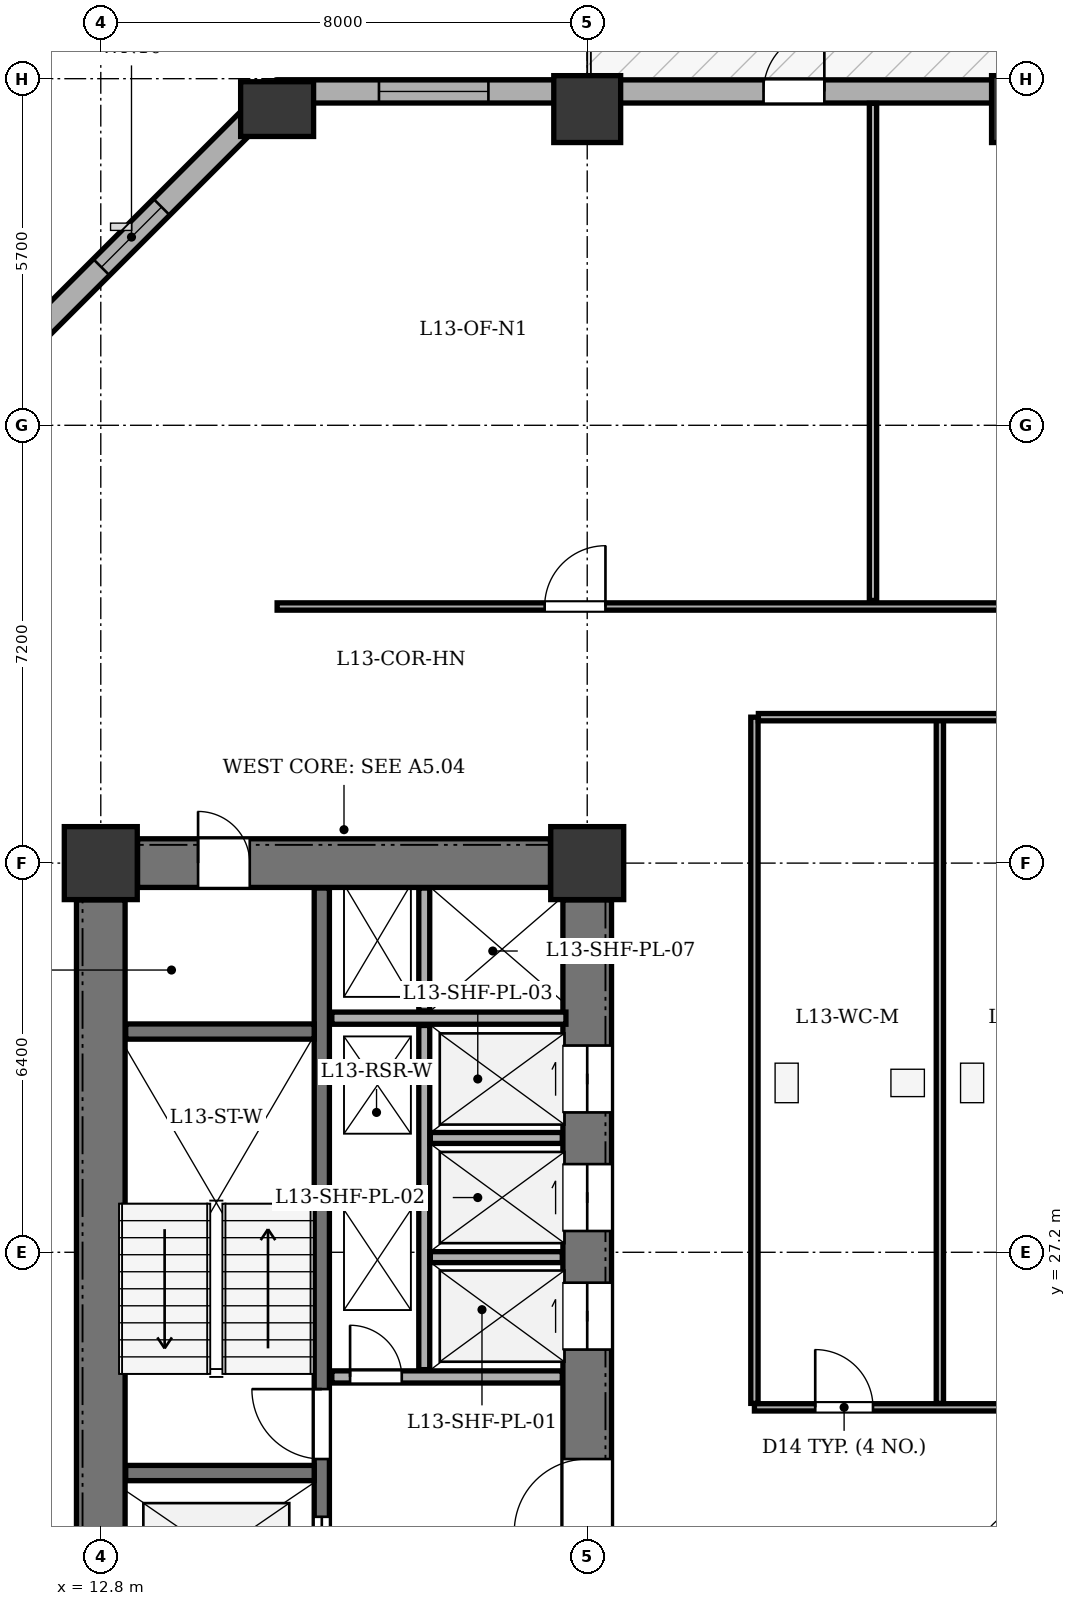
"""IFC4 building model, lengths in metres.
Left out: names, types, materials, properties, quantities, classifications, styles, units other than length and angle.
Written with IfcOpenShell. Run it as: python <this file> out.ifc"""

import sys

from ifc_helpers import new_model, si_unit, direction, frame, frame_2d, origin, origin_2d, place, context, subcontext, project, spatial, rectangle, extrude, element, fill, save


model = new_model("IFC4")
c1 = context("Model", 3, precision=1e-05, world=origin(), true_north=direction((0.0, 1.0)))
c2 = subcontext(c1, "Body", "Model", "MODEL_VIEW")
j1 = project(units=[si_unit("LENGTHUNIT", "METRE"), si_unit("PLANEANGLEUNIT", "RADIAN")], contexts=[c1])
p1 = place(None, origin())
s1 = spatial("IfcSite", under=j1, at=p1, CompositionType="ELEMENT")
p2 = place(p1, origin())
s2 = spatial("IfcBuilding", under=s1, at=p2, CompositionType="ELEMENT")
p3 = place(p2, frame((0.0, 0.0, 55.5)))
s3 = spatial("IfcBuildingStorey", under=s2, at=p3, CompositionType="ELEMENT", Elevation=55.5)
for number, where, z_axis, x_axis in (
    (1, (12.8, 33.6, 0.0), (0.0, 0.0, 1.0), (1.0, 0.0, 0.0)),
    (2, (20.8, 33.6, 0.0), (0.0, 0.0, 1.0), (1.0, 0.0, 0.0)),
):
    element("IfcColumn", number, at=place(p3, frame(where, z_axis=z_axis, x_axis=x_axis)), inside=s3, PredefinedType="COLUMN", context=c2, shape_type="SweptSolid", body=[
        extrude(rectangle(XDim=1.2, YDim=1.2, at=origin_2d()), origin(), (0.0, 0.0, 1.0), 3.9),
    ])
p4 = place(p3, frame((15.7, 46.0, 0.0), z_axis=(0.0, 0.0, 1.0), x_axis=(1.0, 0.0, 0.0)))
e3 = element("IfcColumn", 3, at=p4, inside=s3, PredefinedType="COLUMN", context=c2, shape_type="SweptSolid", body=[
    extrude(rectangle(XDim=0.9, YDim=1.2, at=origin_2d()), origin(), (0.0, 0.0, 1.0), 3.9),
])
for number, where, z_axis, x_axis in (
    (4, (20.8, 46.0, 0.0), (0.0, 0.0, 1.0), (1.0, 0.0, 0.0)),
    (5, (28.0, 46.0, 0.0), (0.0, 0.0, 1.0), (1.0, 0.0, 0.0)),
):
    element("IfcColumn", number, at=place(p3, frame(where, z_axis=z_axis, x_axis=x_axis)), inside=s3, PredefinedType="COLUMN", context=c2, shape_type="SweptSolid", body=[
        extrude(rectangle(XDim=1.1, YDim=1.1, at=origin_2d()), origin(), (0.0, 0.0, 1.0), 3.9),
    ])
p5 = place(p3, frame((10.91, 41.5, 0.0), z_axis=(0.0, 0.0, 1.0), x_axis=(0.707106781187, 0.707106781187, 0.0)))
e6 = element("IfcWall", 6, at=p5, inside=s3, PredefinedType="STANDARD", context=c2, shape_type="SweptSolid", body=[
    extrude(rectangle(XDim=6.774, YDim=0.38, at=frame_2d((3.387, 0.0))), origin(), (0.0, 0.0, 1.0), 3.135),
])
p6 = place(p5, frame((2.687, 0.0, 0.8)))
e7 = element("IfcOpeningElement", 7, at=p6, cuts=e6, PredefinedType="OPENING", context=c2, shape_type="SweptSolid", body=[
    extrude(rectangle(XDim=1.4, YDim=1.65, at=frame_2d((0.7, 0.825))), frame((0.0, 0.2, 0.0), z_axis=(0.0, -1.0, 0.0), x_axis=(1.0, 0.0, 0.0)), (0.0, 0.0, 1.0), 0.4),
])
p7 = place(p3, frame((15.7, 46.29, 0.0), z_axis=(0.0, 0.0, 1.0), x_axis=(1.0, 0.0, 0.0)))
e8 = element("IfcWall", 8, at=p7, inside=s3, PredefinedType="STANDARD", context=c2, shape_type="SweptSolid", body=[
    extrude(rectangle(XDim=35.0, YDim=0.38, at=frame_2d((17.5, 0.0))), origin(), (0.0, 0.0, 1.0), 3.135),
])
p8 = place(p7, frame((8.0, 0.0, 0.0)))
e9 = element("IfcOpeningElement", 9, at=p8, cuts=e8, PredefinedType="OPENING", context=c2, shape_type="SweptSolid", body=[
    extrude(rectangle(XDim=1.0, YDim=2.02, at=frame_2d((0.5, 1.01))), frame((0.0, 0.2, 0.0), z_axis=(0.0, -1.0, 0.0), x_axis=(1.0, 0.0, 0.0)), (0.0, 0.0, 1.0), 0.4),
])
p9 = place(p7, frame((1.675, 0.0, 0.8)))
e10 = element("IfcOpeningElement", 10, at=p9, cuts=e8, PredefinedType="OPENING", context=c2, shape_type="SweptSolid", body=[
    extrude(rectangle(XDim=1.8, YDim=1.9, at=frame_2d((0.9, 0.95))), frame((0.0, 0.2, 0.0), z_axis=(0.0, -1.0, 0.0), x_axis=(1.0, 0.0, 0.0)), (0.0, 0.0, 1.0), 0.4),
])
p10 = place(p7, frame((13.656, 0.0, 0.8)))
e11 = element("IfcOpeningElement", 11, at=p10, cuts=e8, PredefinedType="OPENING", context=c2, shape_type="SweptSolid", body=[
    extrude(rectangle(XDim=1.8, YDim=1.9, at=frame_2d((0.9, 0.95))), frame((0.0, 0.2, 0.0), z_axis=(0.0, -1.0, 0.0), x_axis=(1.0, 0.0, 0.0)), (0.0, 0.0, 1.0), 0.4),
])
p11 = place(p7, frame((16.344, 0.0, 0.8)))
e12 = element("IfcOpeningElement", 12, at=p11, cuts=e8, PredefinedType="OPENING", context=c2, shape_type="SweptSolid", body=[
    extrude(rectangle(XDim=1.8, YDim=1.9, at=frame_2d((0.9, 0.95))), frame((0.0, 0.2, 0.0), z_axis=(0.0, -1.0, 0.0), x_axis=(1.0, 0.0, 0.0)), (0.0, 0.0, 1.0), 0.4),
])
p12 = place(p7, frame((24.925, 0.0, 0.8)))
e13 = element("IfcOpeningElement", 13, at=p12, cuts=e8, PredefinedType="OPENING", context=c2, shape_type="SweptSolid", body=[
    extrude(rectangle(XDim=1.8, YDim=1.9, at=frame_2d((0.9, 0.95))), frame((0.0, 0.2, 0.0), z_axis=(0.0, -1.0, 0.0), x_axis=(1.0, 0.0, 0.0)), (0.0, 0.0, 1.0), 0.4),
])
p13 = place(p7, frame((30.025, 0.0, 0.8)))
e14 = element("IfcOpeningElement", 14, at=p13, cuts=e8, PredefinedType="OPENING", context=c2, shape_type="SweptSolid", body=[
    extrude(rectangle(XDim=2.4, YDim=1.9, at=frame_2d((1.2, 0.95))), frame((0.0, 0.2, 0.0), z_axis=(0.0, -1.0, 0.0), x_axis=(1.0, 0.0, 0.0)), (0.0, 0.0, 1.0), 0.4),
])
p14 = place(p3, frame((12.8, 21.405, 0.0), z_axis=(0.0, 0.0, 1.0), x_axis=(0.0, 1.0, 0.0)))
e15 = element("IfcWall", 15, at=p14, inside=s3, PredefinedType="SHEAR", context=c2, shape_type="SweptSolid", body=[
    extrude(rectangle(XDim=11.59, YDim=0.8, at=frame_2d((5.795, 0.0))), origin(), (0.0, 0.0, 1.0), 3.6),
])
p15 = place(p3, frame((13.405, 33.6, 0.0), z_axis=(0.0, 0.0, 1.0), x_axis=(1.0, 0.0, 0.0)))
e16 = element("IfcWall", 16, at=p15, inside=s3, PredefinedType="SHEAR", context=c2, shape_type="SweptSolid", body=[
    extrude(rectangle(XDim=6.79, YDim=0.8, at=frame_2d((3.395, 0.0))), origin(), (0.0, 0.0, 1.0), 3.6),
])
p16 = place(p15, frame((0.995, 0.0, 0.0)))
e17 = element("IfcOpeningElement", 17, at=p16, cuts=e16, PredefinedType="OPENING", context=c2, shape_type="SweptSolid", body=[
    extrude(rectangle(XDim=0.85, YDim=2.02, at=frame_2d((0.425, 1.01))), frame((0.0, 0.41, 0.0), z_axis=(0.0, -1.0, 0.0), x_axis=(1.0, 0.0, 0.0)), (0.0, 0.0, 1.0), 0.82),
])
p17 = place(p3, frame((20.8, 21.405, 0.0), z_axis=(0.0, 0.0, 1.0), x_axis=(0.0, 1.0, 0.0)))
e18 = element("IfcWall", 18, at=p17, inside=s3, PredefinedType="SHEAR", context=c2, shape_type="SweptSolid", body=[
    extrude(rectangle(XDim=11.59, YDim=0.8, at=frame_2d((5.795, 0.0))), origin(), (0.0, 0.0, 1.0), 3.6),
])
p18 = place(p17, frame((1.195, 0.0, 0.0)))
e19 = element("IfcOpeningElement", 19, at=p18, cuts=e18, PredefinedType="OPENING", context=c2, shape_type="SweptSolid", body=[
    extrude(rectangle(XDim=1.2, YDim=2.15, at=frame_2d((0.6, 1.075))), frame((0.0, 0.41, 0.0), z_axis=(0.0, -1.0, 0.0), x_axis=(1.0, 0.0, 0.0)), (0.0, 0.0, 1.0), 0.82),
])
p19 = place(p17, frame((4.195, 0.0, 0.0)))
e20 = element("IfcOpeningElement", 20, at=p19, cuts=e18, PredefinedType="OPENING", context=c2, shape_type="SweptSolid", body=[
    extrude(rectangle(XDim=1.1, YDim=2.1, at=frame_2d((0.55, 1.05))), frame((0.0, 0.41, 0.0), z_axis=(0.0, -1.0, 0.0), x_axis=(1.0, 0.0, 0.0)), (0.0, 0.0, 1.0), 0.82),
])
p20 = place(p17, frame((6.145, 0.0, 0.0)))
e21 = element("IfcOpeningElement", 21, at=p20, cuts=e18, PredefinedType="OPENING", context=c2, shape_type="SweptSolid", body=[
    extrude(rectangle(XDim=1.1, YDim=2.1, at=frame_2d((0.55, 1.05))), frame((0.0, 0.41, 0.0), z_axis=(0.0, -1.0, 0.0), x_axis=(1.0, 0.0, 0.0)), (0.0, 0.0, 1.0), 0.82),
])
p21 = place(p17, frame((8.095, 0.0, 0.0)))
e22 = element("IfcOpeningElement", 22, at=p21, cuts=e18, PredefinedType="OPENING", context=c2, shape_type="SweptSolid", body=[
    extrude(rectangle(XDim=1.1, YDim=2.1, at=frame_2d((0.55, 1.05))), frame((0.0, 0.41, 0.0), z_axis=(0.0, -1.0, 0.0), x_axis=(1.0, 0.0, 0.0)), (0.0, 0.0, 1.0), 0.82),
])
p22 = place(p3, frame((16.435, 21.21, 0.0), z_axis=(0.0, 0.0, 1.0), x_axis=(0.0, 1.0, 0.0)))
e23 = element("IfcWall", 23, at=p22, inside=s3, PredefinedType="SHEAR", context=c2, shape_type="SweptSolid", body=[
    extrude(rectangle(XDim=11.98, YDim=0.25, at=frame_2d((5.99, 0.0))), origin(), (0.0, 0.0, 1.0), 3.6),
])
p23 = place(p22, frame((0.44, 0.0, 0.0)))
e24 = element("IfcOpeningElement", 24, at=p23, cuts=e23, PredefinedType="OPENING", context=c2, shape_type="SweptSolid", body=[
    extrude(rectangle(XDim=1.2, YDim=2.15, at=frame_2d((0.6, 1.075))), frame((0.0, 0.135, 0.0), z_axis=(0.0, -1.0, 0.0), x_axis=(1.0, 0.0, 0.0)), (0.0, 0.0, 1.0), 0.27),
])
p24 = place(p22, frame((2.59, 0.0, 0.0)))
e25 = element("IfcOpeningElement", 25, at=p24, cuts=e23, PredefinedType="OPENING", context=c2, shape_type="SweptSolid", body=[
    extrude(rectangle(XDim=1.15, YDim=2.15, at=frame_2d((0.575, 1.075))), frame((0.0, 0.135, 0.0), z_axis=(0.0, -1.0, 0.0), x_axis=(1.0, 0.0, 0.0)), (0.0, 0.0, 1.0), 0.27),
])
for number, where, z_axis, x_axis in (
    (26, (13.21, 23.57, 0.0), (0.0, 0.0, 1.0), (1.0, 0.0, 0.0)),
    (27, (13.21, 30.83, 0.0), (0.0, 0.0, 1.0), (1.0, 0.0, 0.0)),
):
    element("IfcWall", number, at=place(p3, frame(where, z_axis=z_axis, x_axis=x_axis)), inside=s3, PredefinedType="SHEAR", context=c2, shape_type="SweptSolid", body=[
        extrude(rectangle(XDim=3.1, YDim=0.25, at=frame_2d((1.55, 0.0))), origin(), (0.0, 0.0, 1.0), 3.6),
    ])
p25 = place(p3, frame((16.6, 25.15, 0.0), z_axis=(0.0, 0.0, 1.0), x_axis=(1.0, 0.0, 0.0)))
e28 = element("IfcWall", 28, at=p25, inside=s3, PredefinedType="SOLIDWALL", context=c2, shape_type="SweptSolid", body=[
    extrude(rectangle(XDim=3.79, YDim=0.2, at=frame_2d((1.895, 0.0))), origin(), (0.0, 0.0, 1.0), 3.6),
])
p26 = place(p25, frame((0.3, 0.0, 0.0)))
e29 = element("IfcOpeningElement", 29, at=p26, cuts=e28, PredefinedType="OPENING", context=c2, shape_type="SweptSolid", body=[
    extrude(rectangle(XDim=0.85, YDim=2.02, at=frame_2d((0.425, 1.01))), frame((0.0, 0.11, 0.0), z_axis=(0.0, -1.0, 0.0), x_axis=(1.0, 0.0, 0.0)), (0.0, 0.0, 1.0), 0.22),
])
p27 = place(p3, frame((16.6, 31.05, 0.0), z_axis=(0.0, 0.0, 1.0), x_axis=(1.0, 0.0, 0.0)))
e30 = element("IfcWall", 30, at=p27, inside=s3, PredefinedType="SOLIDWALL", context=c2, shape_type="SweptSolid", body=[
    extrude(rectangle(XDim=3.85, YDim=0.2, at=frame_2d((1.925, 0.0))), origin(), (0.0, 0.0, 1.0), 3.6),
])
p28 = place(p3, frame((18.12, 25.27, 0.0), z_axis=(0.0, 0.0, 1.0), x_axis=(0.0, 1.0, 0.0)))
e31 = element("IfcWall", 31, at=p28, inside=s3, PredefinedType="PARTITIONING", context=c2, shape_type="SweptSolid", body=[
    extrude(rectangle(XDim=5.66, YDim=0.18, at=frame_2d((2.83, 0.0))), origin(), (0.0, 0.0, 1.0), 3.6),
])
p29 = place(p3, frame((18.12, 31.17, 0.0), z_axis=(0.0, 0.0, 1.0), x_axis=(0.0, 1.0, 0.0)))
e32 = element("IfcWall", 32, at=p29, inside=s3, PredefinedType="PARTITIONING", context=c2, shape_type="SweptSolid", body=[
    extrude(rectangle(XDim=2.02, YDim=0.18, at=frame_2d((1.01, 0.0))), origin(), (0.0, 0.0, 1.0), 3.6),
])
for number, where, z_axis, x_axis in (
    (33, (18.22, 27.12, 0.0), (0.0, 0.0, 1.0), (1.0, 0.0, 0.0)),
    (34, (18.22, 29.08, 0.0), (0.0, 0.0, 1.0), (1.0, 0.0, 0.0)),
):
    element("IfcWall", number, at=place(p3, frame(where, z_axis=z_axis, x_axis=x_axis)), inside=s3, PredefinedType="PARTITIONING", context=c2, shape_type="SweptSolid", body=[
        extrude(rectangle(XDim=2.17, YDim=0.18, at=frame_2d((1.085, 0.0))), origin(), (0.0, 0.0, 1.0), 3.6),
    ])
p30 = place(p3, frame((23.55, 24.65, 0.0), z_axis=(0.0, 0.0, 1.0), x_axis=(1.0, 0.0, 0.0)))
e35 = element("IfcWall", 35, at=p30, inside=s3, PredefinedType="PARTITIONING", context=c2, shape_type="SweptSolid", body=[
    extrude(rectangle(XDim=8.9, YDim=0.12, at=frame_2d((4.45, 0.0))), origin(), (0.0, 0.0, 1.0), 3.135),
])
p31 = place(p30, frame((1.0, 0.0, 0.0)))
e36 = element("IfcOpeningElement", 36, at=p31, cuts=e35, PredefinedType="OPENING", context=c2, shape_type="SweptSolid", body=[
    extrude(rectangle(XDim=0.95, YDim=2.1, at=frame_2d((0.475, 1.05))), frame((0.0, 0.07, 0.0), z_axis=(0.0, -1.0, 0.0), x_axis=(1.0, 0.0, 0.0)), (0.0, 0.0, 1.0), 0.14),
])
p32 = place(p30, frame((4.1, 0.0, 0.0)))
e37 = element("IfcOpeningElement", 37, at=p32, cuts=e35, PredefinedType="OPENING", context=c2, shape_type="SweptSolid", body=[
    extrude(rectangle(XDim=0.95, YDim=2.1, at=frame_2d((0.475, 1.05))), frame((0.0, 0.07, 0.0), z_axis=(0.0, -1.0, 0.0), x_axis=(1.0, 0.0, 0.0)), (0.0, 0.0, 1.0), 0.14),
])
p33 = place(p30, frame((7.0, 0.0, 0.0)))
e38 = element("IfcOpeningElement", 38, at=p33, cuts=e35, PredefinedType="OPENING", context=c2, shape_type="SweptSolid", body=[
    extrude(rectangle(XDim=1.0, YDim=2.1, at=frame_2d((0.5, 1.05))), frame((0.0, 0.07, 0.0), z_axis=(0.0, -1.0, 0.0), x_axis=(1.0, 0.0, 0.0)), (0.0, 0.0, 1.0), 0.14),
])
for number, where, z_axis, x_axis in (
    (39, (23.55, 24.715, 0.0), (0.0, 0.0, 1.0), (0.0, 1.0, 0.0)),
    (40, (26.6, 24.715, 0.0), (0.0, 0.0, 1.0), (0.0, 1.0, 0.0)),
):
    element("IfcWall", number, at=place(p3, frame(where, z_axis=z_axis, x_axis=x_axis)), inside=s3, PredefinedType="PARTITIONING", context=c2, shape_type="SweptSolid", body=[
        extrude(rectangle(XDim=11.285, YDim=0.12, at=frame_2d((5.643, 0.0))), origin(), (0.0, 0.0, 1.0), 3.6),
    ])
p34 = place(p3, frame((23.615, 36.0, 0.0), z_axis=(0.0, 0.0, 1.0), x_axis=(1.0, 0.0, 0.0)))
e41 = element("IfcWall", 41, at=p34, inside=s3, PredefinedType="PARTITIONING", context=c2, shape_type="SweptSolid", body=[
    extrude(rectangle(XDim=8.77, YDim=0.12, at=frame_2d((4.385, 0.0))), origin(), (0.0, 0.0, 1.0), 3.6),
])
p35 = place(p3, frame((15.7, 37.82, 0.0), z_axis=(0.0, 0.0, 1.0), x_axis=(1.0, 0.0, 0.0)))
e42 = element("IfcWall", 42, at=p35, inside=s3, PredefinedType="PARTITIONING", context=c2, shape_type="SweptSolid", body=[
    extrude(rectangle(XDim=35.0, YDim=0.12, at=frame_2d((17.5, 0.0))), origin(), (0.0, 0.0, 1.0), 3.6),
])
p36 = place(p35, frame((4.4, 0.0, 0.0)))
e43 = element("IfcOpeningElement", 43, at=p36, cuts=e42, PredefinedType="OPENING", context=c2, shape_type="SweptSolid", body=[
    extrude(rectangle(XDim=1.0, YDim=2.1, at=frame_2d((0.5, 1.05))), frame((0.0, 0.07, 0.0), z_axis=(0.0, -1.0, 0.0), x_axis=(1.0, 0.0, 0.0)), (0.0, 0.0, 1.0), 0.14),
])
p37 = place(p35, frame((15.6, 0.0, 0.0)))
e44 = element("IfcOpeningElement", 44, at=p37, cuts=e42, PredefinedType="OPENING", context=c2, shape_type="SweptSolid", body=[
    extrude(rectangle(XDim=1.0, YDim=2.1, at=frame_2d((0.5, 1.05))), frame((0.0, 0.07, 0.0), z_axis=(0.0, -1.0, 0.0), x_axis=(1.0, 0.0, 0.0)), (0.0, 0.0, 1.0), 0.14),
])
p38 = place(p35, frame((28.2, 0.0, 0.0)))
e45 = element("IfcOpeningElement", 45, at=p38, cuts=e42, PredefinedType="OPENING", context=c2, shape_type="SweptSolid", body=[
    extrude(rectangle(XDim=1.0, YDim=2.1, at=frame_2d((0.5, 1.05))), frame((0.0, 0.07, 0.0), z_axis=(0.0, -1.0, 0.0), x_axis=(1.0, 0.0, 0.0)), (0.0, 0.0, 1.0), 0.14),
])
p39 = place(p3, frame((25.5, 37.92, 0.0), z_axis=(0.0, 0.0, 1.0), x_axis=(0.0, 1.0, 0.0)))
e46 = element("IfcWall", 46, at=p39, inside=s3, PredefinedType="PARTITIONING", context=c2, shape_type="SweptSolid", body=[
    extrude(rectangle(XDim=8.175, YDim=0.12, at=frame_2d((4.087, 0.0))), origin(), (0.0, 0.0, 1.0), 3.6),
])
p40 = place(p8, origin())
e47 = element("IfcDoor", 47, at=p40, inside=s3, OperationType="SINGLE_SWING_RIGHT", PredefinedType="DOOR", context=c2, shape_type="SweptSolid", body=[
    extrude(rectangle(XDim=1.0, YDim=2.02, at=frame_2d((0.5, 1.01))), frame((0.0, 0.025, 0.0), z_axis=(0.0, -1.0, 0.0), x_axis=(1.0, 0.0, 0.0)), (0.0, 0.0, 1.0), 0.05),
])
fill(e9, e47)
p41 = place(p9, origin())
e48 = element("IfcWindow", 48, at=p41, inside=s3, PartitioningType="SINGLE_PANEL", PredefinedType="WINDOW", context=c2, shape_type="SweptSolid", body=[
    extrude(rectangle(XDim=1.8, YDim=1.9, at=frame_2d((0.9, 0.95))), frame((0.0, -0.01, 0.0), z_axis=(0.0, -1.0, 0.0), x_axis=(1.0, 0.0, 0.0)), (0.0, 0.0, 1.0), 0.06),
])
fill(e10, e48)
p42 = place(p6, origin())
e49 = element("IfcWindow", 49, at=p42, inside=s3, PartitioningType="SINGLE_PANEL", PredefinedType="WINDOW", context=c2, shape_type="SweptSolid", body=[
    extrude(rectangle(XDim=1.4, YDim=1.65, at=frame_2d((0.7, 0.825))), frame((0.0, -0.01, 0.0), z_axis=(0.0, -1.0, 0.0), x_axis=(1.0, 0.0, 0.0)), (0.0, 0.0, 1.0), 0.06),
])
fill(e7, e49)
p43 = place(p16, origin())
e50 = element("IfcDoor", 50, at=p43, inside=s3, OperationType="SINGLE_SWING_LEFT", PredefinedType="DOOR", context=c2, shape_type="SweptSolid", body=[
    extrude(rectangle(XDim=0.85, YDim=2.02, at=frame_2d((0.425, 1.01))), frame((0.0, 0.025, 0.0), z_axis=(0.0, -1.0, 0.0), x_axis=(1.0, 0.0, 0.0)), (0.0, 0.0, 1.0), 0.05),
])
fill(e17, e50)
p44 = place(p18, origin())
e51 = element("IfcDoor", 51, at=p44, inside=s3, OperationType="SINGLE_SWING_LEFT", PredefinedType="DOOR", context=c2, shape_type="SweptSolid", body=[
    extrude(rectangle(XDim=1.2, YDim=2.15, at=frame_2d((0.6, 1.075))), frame((0.0, 0.025, 0.0), z_axis=(0.0, -1.0, 0.0), x_axis=(1.0, 0.0, 0.0)), (0.0, 0.0, 1.0), 0.05),
])
fill(e19, e51)
p45 = place(p19, origin())
e52 = element("IfcDoor", 52, at=p45, inside=s3, OperationType="DOUBLE_DOOR_SLIDING", PredefinedType="DOOR", context=c2, shape_type="SweptSolid", body=[
    extrude(rectangle(XDim=1.1, YDim=2.1, at=frame_2d((0.55, 1.05))), frame((0.0, 0.025, 0.0), z_axis=(0.0, -1.0, 0.0), x_axis=(1.0, 0.0, 0.0)), (0.0, 0.0, 1.0), 0.05),
])
fill(e20, e52)
p46 = place(p20, origin())
e53 = element("IfcDoor", 53, at=p46, inside=s3, OperationType="DOUBLE_DOOR_SLIDING", PredefinedType="DOOR", context=c2, shape_type="SweptSolid", body=[
    extrude(rectangle(XDim=1.1, YDim=2.1, at=frame_2d((0.55, 1.05))), frame((0.0, 0.025, 0.0), z_axis=(0.0, -1.0, 0.0), x_axis=(1.0, 0.0, 0.0)), (0.0, 0.0, 1.0), 0.05),
])
fill(e21, e53)
p47 = place(p21, origin())
e54 = element("IfcDoor", 54, at=p47, inside=s3, OperationType="DOUBLE_DOOR_SLIDING", PredefinedType="DOOR", context=c2, shape_type="SweptSolid", body=[
    extrude(rectangle(XDim=1.1, YDim=2.1, at=frame_2d((0.55, 1.05))), frame((0.0, 0.025, 0.0), z_axis=(0.0, -1.0, 0.0), x_axis=(1.0, 0.0, 0.0)), (0.0, 0.0, 1.0), 0.05),
])
fill(e22, e54)
p48 = place(p23, origin())
e55 = element("IfcDoor", 55, at=p48, inside=s3, OperationType="DOUBLE_DOOR_SLIDING", PredefinedType="DOOR", context=c2, shape_type="SweptSolid", body=[
    extrude(rectangle(XDim=1.2, YDim=2.15, at=frame_2d((0.6, 1.075))), frame((0.0, 0.025, 0.0), z_axis=(0.0, -1.0, 0.0), x_axis=(1.0, 0.0, 0.0)), (0.0, 0.0, 1.0), 0.05),
])
fill(e24, e55)
p49 = place(p24, origin())
e56 = element("IfcDoor", 56, at=p49, inside=s3, OperationType="SINGLE_SWING_RIGHT", PredefinedType="DOOR", context=c2, shape_type="SweptSolid", body=[
    extrude(rectangle(XDim=1.15, YDim=2.15, at=frame_2d((0.575, 1.075))), frame((0.0, 0.025, 0.0), z_axis=(0.0, -1.0, 0.0), x_axis=(1.0, 0.0, 0.0)), (0.0, 0.0, 1.0), 0.05),
])
fill(e25, e56)
p50 = place(p26, origin())
e57 = element("IfcDoor", 57, at=p50, inside=s3, OperationType="SINGLE_SWING_LEFT", PredefinedType="DOOR", context=c2, shape_type="SweptSolid", body=[
    extrude(rectangle(XDim=0.85, YDim=2.02, at=frame_2d((0.425, 1.01))), frame((0.0, 0.025, 0.0), z_axis=(0.0, -1.0, 0.0), x_axis=(1.0, 0.0, 0.0)), (0.0, 0.0, 1.0), 0.05),
])
fill(e29, e57)
p51 = place(p31, origin())
e58 = element("IfcDoor", 58, at=p51, inside=s3, OperationType="SINGLE_SWING_LEFT", PredefinedType="DOOR", context=c2, shape_type="SweptSolid", body=[
    extrude(rectangle(XDim=0.95, YDim=2.1, at=frame_2d((0.475, 1.05))), frame((0.0, 0.025, 0.0), z_axis=(0.0, -1.0, 0.0), x_axis=(1.0, 0.0, 0.0)), (0.0, 0.0, 1.0), 0.05),
])
fill(e36, e58)
p52 = place(p36, origin())
e59 = element("IfcDoor", 59, at=p52, inside=s3, OperationType="SINGLE_SWING_RIGHT", PredefinedType="DOOR", context=c2, shape_type="SweptSolid", body=[
    extrude(rectangle(XDim=1.0, YDim=2.1, at=frame_2d((0.5, 1.05))), frame((0.0, 0.025, 0.0), z_axis=(0.0, -1.0, 0.0), x_axis=(1.0, 0.0, 0.0)), (0.0, 0.0, 1.0), 0.05),
])
fill(e43, e59)
save(model, sys.argv[1])
